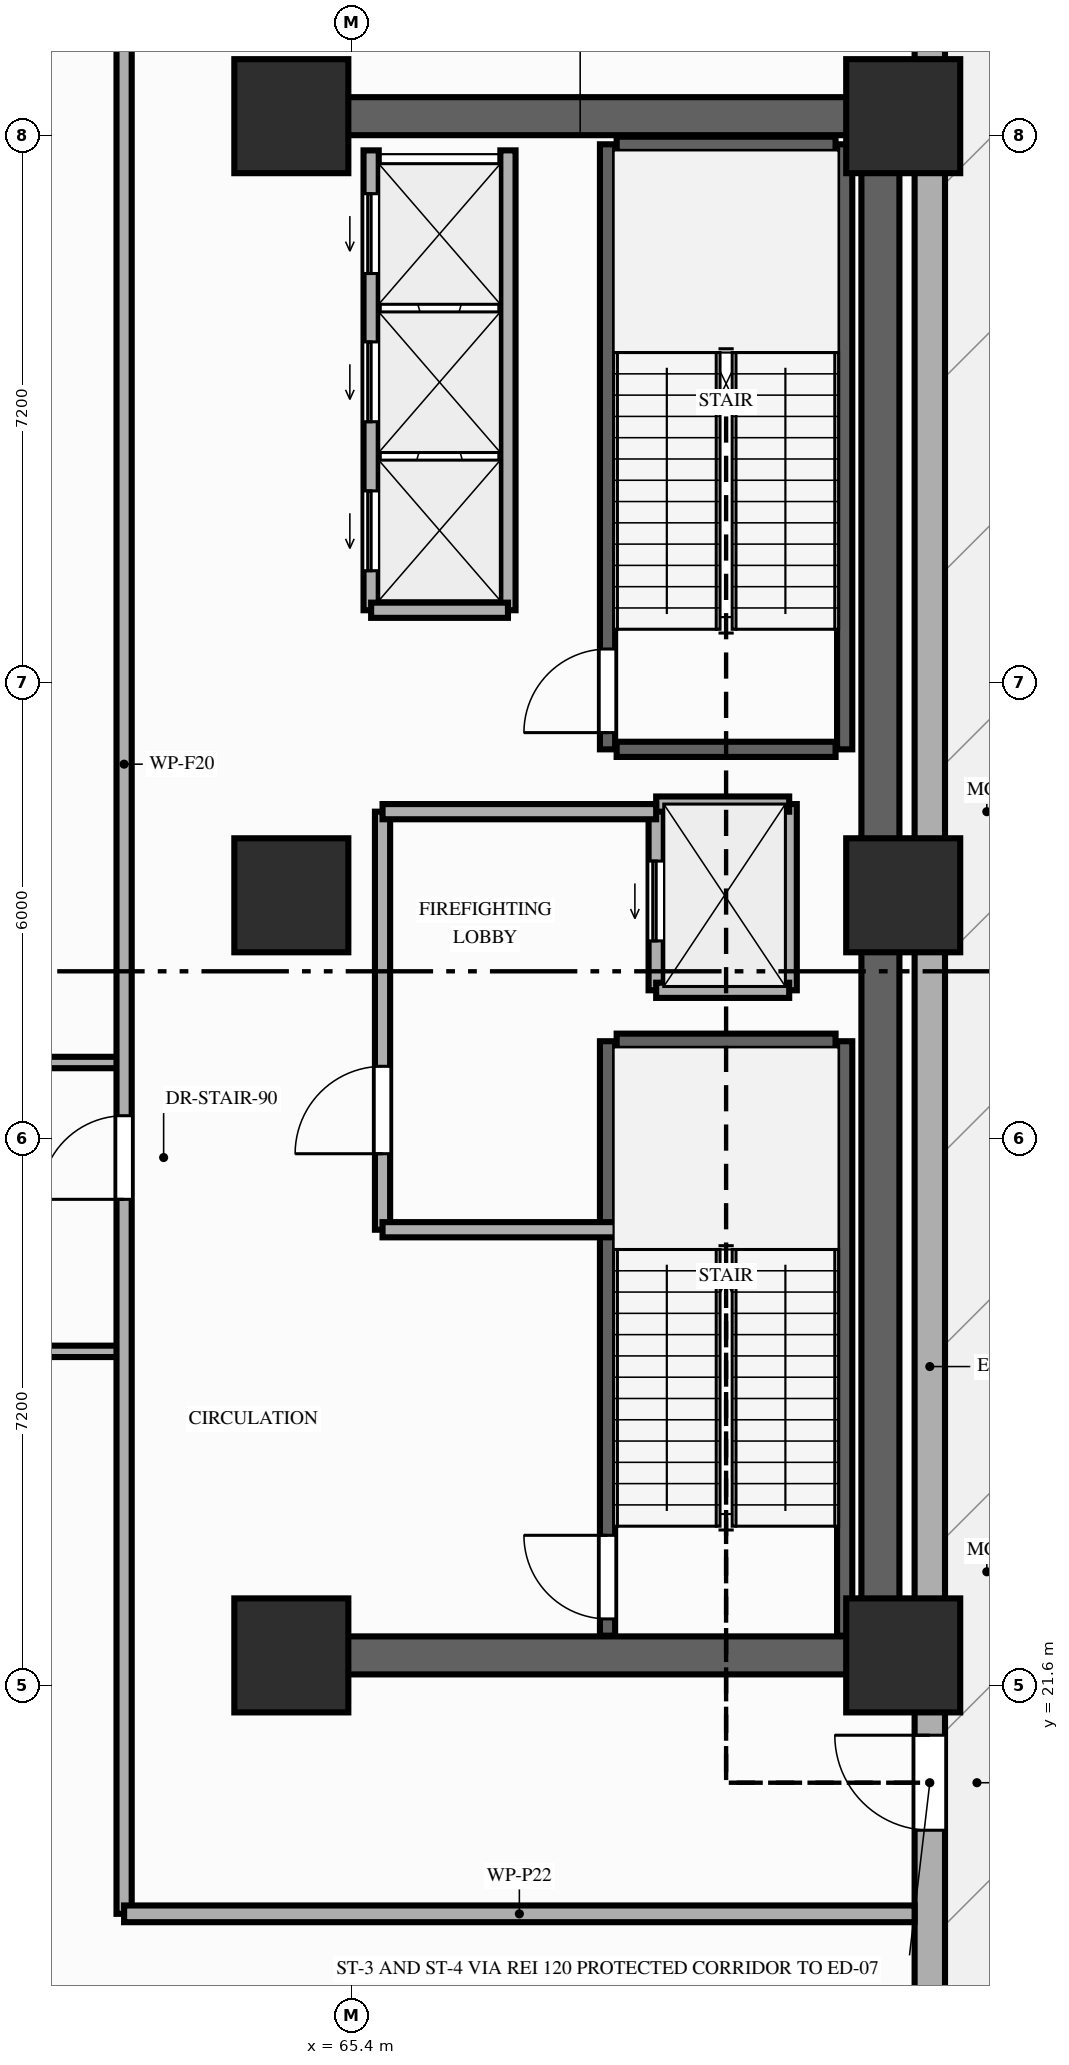
"""IFC4 building model, lengths in metres.
Left out: names, types, materials, properties, quantities, classifications, styles, units other than length and angle.
Written with IfcOpenShell. Run it as: python <this file> out.ifc"""

import sys

from ifc_helpers import new_model, si_unit, direction, frame, frame_2d, origin, origin_2d, place, context, subcontext, project, spatial, rectangle, extrude, element, fill, save


model = new_model("IFC4")
c1 = context("Model", 3, precision=1e-05, world=origin(), true_north=direction((0.0, 1.0)))
c2 = subcontext(c1, "Body", "Model", "MODEL_VIEW")
j1 = project(units=[si_unit("LENGTHUNIT", "METRE"), si_unit("PLANEANGLEUNIT", "RADIAN")], contexts=[c1])
p1 = place(None, origin())
s1 = spatial("IfcSite", under=j1, at=p1, CompositionType="ELEMENT")
p2 = place(p1, origin())
s2 = spatial("IfcBuilding", under=s1, at=p2, CompositionType="ELEMENT")
p3 = place(p2, origin())
s3 = spatial("IfcBuildingStorey", under=s2, at=p3, CompositionType="ELEMENT", Elevation=0.0)
for number, where, z_axis, x_axis in (
    (1, (64.6, 22.0, 0.0), (0.0, 0.0, 1.0), (1.0, 0.0, 0.0)),
    (2, (72.65, 22.0, 0.0), (0.0, 0.0, 1.0), (1.0, 0.0, 0.0)),
    (3, (64.6, 32.0, 0.0), (0.0, 0.0, 1.0), (1.0, 0.0, 0.0)),
    (4, (72.65, 32.0, 0.0), (0.0, 0.0, 1.0), (1.0, 0.0, 0.0)),
    (5, (64.6, 42.25, 0.0), (0.0, 0.0, 1.0), (1.0, 0.0, 0.0)),
    (6, (72.65, 42.25, 0.0), (0.0, 0.0, 1.0), (1.0, 0.0, 0.0)),
):
    element("IfcColumn", number, at=place(p3, frame(where, z_axis=z_axis, x_axis=x_axis)), inside=s3, PredefinedType="COLUMN", context=c2, shape_type="SweptSolid", body=[
        extrude(rectangle(XDim=1.5, YDim=1.5, at=origin_2d()), origin(), (0.0, 0.0, 1.0), 4.6),
    ])
p4 = place(p3, frame((73.0, 2.8, 0.0), z_axis=(0.0, 0.0, 1.0), x_axis=(0.0, 1.0, 0.0)))
e7 = element("IfcWall", 7, at=p4, inside=s3, PredefinedType="STANDARD", context=c2, shape_type="SweptSolid", body=[
    extrude(rectangle(XDim=46.0, YDim=0.4, at=frame_2d((23.0, 0.0))), origin(), (0.0, 0.0, 1.0), 3.63),
])
p5 = place(p4, frame((11.6, 0.0, 0.0)))
e8 = element("IfcOpeningElement", 8, at=p5, cuts=e7, PredefinedType="OPENING", context=c2, shape_type="SweptSolid", body=[
    extrude(rectangle(XDim=1.25, YDim=2.2, at=frame_2d((0.625, 1.1))), frame((0.0, 0.21, 0.0), z_axis=(0.0, -1.0, 0.0), x_axis=(1.0, 0.0, 0.0)), (0.0, 0.0, 1.0), 0.42),
])
p6 = place(p4, frame((4.6, 0.0, 0.0)))
e9 = element("IfcOpeningElement", 9, at=p6, cuts=e7, PredefinedType="OPENING", context=c2, shape_type="SweptSolid", body=[
    extrude(rectangle(XDim=1.8, YDim=2.25, at=frame_2d((0.9, 1.125))), frame((0.0, 0.21, 0.0), z_axis=(0.0, -1.0, 0.0), x_axis=(1.0, 0.0, 0.0)), (0.0, 0.0, 1.0), 0.42),
])
p7 = place(p4, frame((16.9, 0.0, 0.0)))
e10 = element("IfcOpeningElement", 10, at=p7, cuts=e7, PredefinedType="OPENING", context=c2, shape_type="SweptSolid", body=[
    extrude(rectangle(XDim=1.25, YDim=2.2, at=frame_2d((0.625, 1.1))), frame((0.0, 0.21, 0.0), z_axis=(0.0, -1.0, 0.0), x_axis=(1.0, 0.0, 0.0)), (0.0, 0.0, 1.0), 0.42),
])
p8 = place(p4, frame((40.95, 0.0, 0.0)))
e11 = element("IfcOpeningElement", 11, at=p8, cuts=e7, PredefinedType="OPENING", context=c2, shape_type="SweptSolid", body=[
    extrude(rectangle(XDim=2.55, YDim=2.55, at=frame_2d((1.275, 1.275))), frame((0.0, 0.21, 0.0), z_axis=(0.0, -1.0, 0.0), x_axis=(1.0, 0.0, 0.0)), (0.0, 0.0, 1.0), 0.42),
])
p9 = place(p3, frame((72.35, 22.0, 0.0), z_axis=(0.0, 0.0, 1.0), x_axis=(0.0, 1.0, 0.0)))
e12 = element("IfcWall", 12, at=p9, inside=s3, PredefinedType="SHEAR", context=c2, shape_type="SweptSolid", body=[
    extrude(rectangle(XDim=20.25, YDim=0.5, at=frame_2d((10.125, 0.0))), origin(), (0.0, 0.0, 1.0), 4.35),
])
for number, where, z_axis, x_axis in (
    (13, (64.6, 42.25, 0.0), (0.0, 0.0, 1.0), (1.0, 0.0, 0.0)),
    (14, (64.6, 22.0, 0.0), (0.0, 0.0, 1.0), (1.0, 0.0, 0.0)),
):
    element("IfcWall", number, at=place(p3, frame(where, z_axis=z_axis, x_axis=x_axis)), inside=s3, PredefinedType="SHEAR", context=c2, shape_type="SweptSolid", body=[
        extrude(rectangle(XDim=7.5, YDim=0.5, at=frame_2d((3.75, 0.0))), origin(), (0.0, 0.0, 1.0), 4.35),
    ])
p10 = place(p3, frame((68.76, 22.26, 0.0), z_axis=(0.0, 0.0, 1.0), x_axis=(0.0, 1.0, 0.0)))
e15 = element("IfcWall", 15, at=p10, inside=s3, PredefinedType="SHEAR", context=c2, shape_type="SweptSolid", body=[
    extrude(rectangle(XDim=7.82, YDim=0.2, at=frame_2d((3.91, 0.0))), origin(), (0.0, 0.0, 1.0), 4.35),
])
p11 = place(p10, frame((0.22, 0.0, 0.0)))
e16 = element("IfcOpeningElement", 16, at=p11, cuts=e15, PredefinedType="OPENING", context=c2, shape_type="SweptSolid", body=[
    extrude(rectangle(XDim=1.1, YDim=2.15, at=frame_2d((0.55, 1.075))), frame((0.0, 0.11, 0.0), z_axis=(0.0, -1.0, 0.0), x_axis=(1.0, 0.0, 0.0)), (0.0, 0.0, 1.0), 0.22),
])
p12 = place(p3, frame((71.88, 22.26, 0.0), z_axis=(0.0, 0.0, 1.0), x_axis=(0.0, 1.0, 0.0)))
e17 = element("IfcWall", 17, at=p12, inside=s3, PredefinedType="SHEAR", context=c2, shape_type="SweptSolid", body=[
    extrude(rectangle(XDim=7.82, YDim=0.2, at=frame_2d((3.91, 0.0))), origin(), (0.0, 0.0, 1.0), 4.35),
])
p13 = place(p3, frame((68.88, 30.08, 0.0), z_axis=(0.0, 0.0, 1.0), x_axis=(1.0, 0.0, 0.0)))
e18 = element("IfcWall", 18, at=p13, inside=s3, PredefinedType="SHEAR", context=c2, shape_type="SweptSolid", body=[
    extrude(rectangle(XDim=2.88, YDim=0.2, at=frame_2d((1.44, 0.0))), origin(), (0.0, 0.0, 1.0), 4.35),
])
p14 = place(p3, frame((68.76, 33.92, 0.0), z_axis=(0.0, 0.0, 1.0), x_axis=(0.0, 1.0, 0.0)))
e19 = element("IfcWall", 19, at=p14, inside=s3, PredefinedType="SHEAR", context=c2, shape_type="SweptSolid", body=[
    extrude(rectangle(XDim=7.96, YDim=0.2, at=frame_2d((3.98, 0.0))), origin(), (0.0, 0.0, 1.0), 4.35),
])
p15 = place(p14, frame((0.22, 0.0, 0.0)))
e20 = element("IfcOpeningElement", 20, at=p15, cuts=e19, PredefinedType="OPENING", context=c2, shape_type="SweptSolid", body=[
    extrude(rectangle(XDim=1.1, YDim=2.15, at=frame_2d((0.55, 1.075))), frame((0.0, 0.11, 0.0), z_axis=(0.0, -1.0, 0.0), x_axis=(1.0, 0.0, 0.0)), (0.0, 0.0, 1.0), 0.22),
])
p16 = place(p3, frame((71.88, 33.92, 0.0), z_axis=(0.0, 0.0, 1.0), x_axis=(0.0, 1.0, 0.0)))
e21 = element("IfcWall", 21, at=p16, inside=s3, PredefinedType="SHEAR", context=c2, shape_type="SweptSolid", body=[
    extrude(rectangle(XDim=7.96, YDim=0.2, at=frame_2d((3.98, 0.0))), origin(), (0.0, 0.0, 1.0), 4.35),
])
for number, where, z_axis, x_axis in (
    (22, (68.88, 41.88, 0.0), (0.0, 0.0, 1.0), (1.0, 0.0, 0.0)),
    (23, (68.88, 33.92, 0.0), (0.0, 0.0, 1.0), (1.0, 0.0, 0.0)),
):
    element("IfcWall", number, at=place(p3, frame(where, z_axis=z_axis, x_axis=x_axis)), inside=s3, PredefinedType="SHEAR", context=c2, shape_type="SweptSolid", body=[
        extrude(rectangle(XDim=2.88, YDim=0.2, at=frame_2d((1.44, 0.0))), origin(), (0.0, 0.0, 1.0), 4.35),
    ])
p17 = place(p3, frame((65.65, 35.75, 0.0), z_axis=(0.0, 0.0, 1.0), x_axis=(0.0, 1.0, 0.0)))
e24 = element("IfcWall", 24, at=p17, inside=s3, PredefinedType="MOVABLE", context=c2, shape_type="SweptSolid", body=[
    extrude(rectangle(XDim=6.05, YDim=0.2, at=frame_2d((3.025, 0.0))), origin(), (0.0, 0.0, 1.0), 4.35),
])
p18 = place(p17, frame((0.52, 0.0, 0.0)))
e25 = element("IfcOpeningElement", 25, at=p18, cuts=e24, PredefinedType="OPENING", context=c2, shape_type="SweptSolid", body=[
    extrude(rectangle(XDim=1.05, YDim=2.15, at=frame_2d((0.525, 1.075))), frame((0.0, 0.11, 0.0), z_axis=(0.0, -1.0, 0.0), x_axis=(1.0, 0.0, 0.0)), (0.0, 0.0, 1.0), 0.22),
])
p19 = place(p17, frame((2.48, 0.0, 0.0)))
e26 = element("IfcOpeningElement", 26, at=p19, cuts=e24, PredefinedType="OPENING", context=c2, shape_type="SweptSolid", body=[
    extrude(rectangle(XDim=1.05, YDim=2.15, at=frame_2d((0.525, 1.075))), frame((0.0, 0.11, 0.0), z_axis=(0.0, -1.0, 0.0), x_axis=(1.0, 0.0, 0.0)), (0.0, 0.0, 1.0), 0.22),
])
p20 = place(p17, frame((4.43, 0.0, 0.0)))
e27 = element("IfcOpeningElement", 27, at=p20, cuts=e24, PredefinedType="OPENING", context=c2, shape_type="SweptSolid", body=[
    extrude(rectangle(XDim=1.05, YDim=2.15, at=frame_2d((0.525, 1.075))), frame((0.0, 0.11, 0.0), z_axis=(0.0, -1.0, 0.0), x_axis=(1.0, 0.0, 0.0)), (0.0, 0.0, 1.0), 0.22),
])
p21 = place(p3, frame((67.45, 35.75, 0.0), z_axis=(0.0, 0.0, 1.0), x_axis=(0.0, 1.0, 0.0)))
e28 = element("IfcWall", 28, at=p21, inside=s3, PredefinedType="MOVABLE", context=c2, shape_type="SweptSolid", body=[
    extrude(rectangle(XDim=6.05, YDim=0.2, at=frame_2d((3.025, 0.0))), origin(), (0.0, 0.0, 1.0), 4.35),
])
p22 = place(p3, frame((65.65, 35.75, 0.0), z_axis=(0.0, 0.0, 1.0), x_axis=(1.0, 0.0, 0.0)))
e29 = element("IfcWall", 29, at=p22, inside=s3, PredefinedType="MOVABLE", context=c2, shape_type="SweptSolid", body=[
    extrude(rectangle(XDim=1.8, YDim=0.2, at=frame_2d((0.9, 0.0))), origin(), (0.0, 0.0, 1.0), 4.35),
])
p23 = place(p3, frame((69.4, 30.75, 0.0), z_axis=(0.0, 0.0, 1.0), x_axis=(0.0, 1.0, 0.0)))
e30 = element("IfcWall", 30, at=p23, inside=s3, PredefinedType="MOVABLE", context=c2, shape_type="SweptSolid", body=[
    extrude(rectangle(XDim=2.45, YDim=0.2, at=frame_2d((1.225, 0.0))), origin(), (0.0, 0.0, 1.0), 4.35),
])
p24 = place(p23, frame((0.65, 0.0, 0.0)))
e31 = element("IfcOpeningElement", 31, at=p24, cuts=e30, PredefinedType="OPENING", context=c2, shape_type="SweptSolid", body=[
    extrude(rectangle(XDim=1.05, YDim=2.15, at=frame_2d((0.525, 1.075))), frame((0.0, 0.11, 0.0), z_axis=(0.0, -1.0, 0.0), x_axis=(1.0, 0.0, 0.0)), (0.0, 0.0, 1.0), 0.22),
])
p25 = place(p3, frame((71.15, 30.75, 0.0), z_axis=(0.0, 0.0, 1.0), x_axis=(0.0, 1.0, 0.0)))
e32 = element("IfcWall", 32, at=p25, inside=s3, PredefinedType="MOVABLE", context=c2, shape_type="SweptSolid", body=[
    extrude(rectangle(XDim=2.45, YDim=0.2, at=frame_2d((1.225, 0.0))), origin(), (0.0, 0.0, 1.0), 4.35),
])
for number, where, z_axis, x_axis in (
    (33, (69.4, 33.2, 0.0), (0.0, 0.0, 1.0), (1.0, 0.0, 0.0)),
    (34, (69.4, 30.75, 0.0), (0.0, 0.0, 1.0), (1.0, 0.0, 0.0)),
):
    element("IfcWall", number, at=place(p3, frame(where, z_axis=z_axis, x_axis=x_axis)), inside=s3, PredefinedType="MOVABLE", context=c2, shape_type="SweptSolid", body=[
        extrude(rectangle(XDim=1.75, YDim=0.2, at=frame_2d((0.875, 0.0))), origin(), (0.0, 0.0, 1.0), 4.35),
    ])
p26 = place(p3, frame((65.8, 27.6, 0.0), z_axis=(0.0, 0.0, 1.0), x_axis=(0.0, 1.0, 0.0)))
e35 = element("IfcWall", 35, at=p26, inside=s3, PredefinedType="PARTITIONING", context=c2, shape_type="SweptSolid", body=[
    extrude(rectangle(XDim=5.5, YDim=0.2, at=frame_2d((2.75, 0.0))), origin(), (0.0, 0.0, 1.0), 4.35),
])
p27 = place(p26, frame((1.0, 0.0, 0.0)))
e36 = element("IfcOpeningElement", 36, at=p27, cuts=e35, PredefinedType="OPENING", context=c2, shape_type="SweptSolid", body=[
    extrude(rectangle(XDim=1.15, YDim=2.15, at=frame_2d((0.575, 1.075))), frame((0.0, 0.11, 0.0), z_axis=(0.0, -1.0, 0.0), x_axis=(1.0, 0.0, 0.0)), (0.0, 0.0, 1.0), 0.22),
])
p28 = place(p3, frame((65.8, 33.1, 0.0), z_axis=(0.0, 0.0, 1.0), x_axis=(1.0, 0.0, 0.0)))
e37 = element("IfcWall", 37, at=p28, inside=s3, PredefinedType="PARTITIONING", context=c2, shape_type="SweptSolid", body=[
    extrude(rectangle(XDim=3.6, YDim=0.2, at=frame_2d((1.8, 0.0))), origin(), (0.0, 0.0, 1.0), 4.35),
])
p29 = place(p3, frame((65.8, 27.6, 0.0), z_axis=(0.0, 0.0, 1.0), x_axis=(1.0, 0.0, 0.0)))
e38 = element("IfcWall", 38, at=p29, inside=s3, PredefinedType="PARTITIONING", context=c2, shape_type="SweptSolid", body=[
    extrude(rectangle(XDim=3.4, YDim=0.2, at=frame_2d((1.7, 0.0))), origin(), (0.0, 0.0, 1.0), 4.35),
])
p30 = place(p3, frame((50.8, 26.0, 0.0), z_axis=(0.0, 0.0, 1.0), x_axis=(1.0, 0.0, 0.0)))
e39 = element("IfcWall", 39, at=p30, inside=s3, PredefinedType="PARTITIONING", context=c2, shape_type="SweptSolid", body=[
    extrude(rectangle(XDim=11.6, YDim=0.15, at=frame_2d((5.8, 0.0))), origin(), (0.0, 0.0, 1.0), 3.63),
])
p31 = place(p30, frame((3.7, 0.0, 0.0)))
e40 = element("IfcOpeningElement", 40, at=p31, cuts=e39, PredefinedType="OPENING", context=c2, shape_type="SweptSolid", body=[
    extrude(rectangle(XDim=1.5, YDim=2.18, at=frame_2d((0.75, 1.09))), frame((0.0, 0.085, 0.0), z_axis=(0.0, -1.0, 0.0), x_axis=(1.0, 0.0, 0.0)), (0.0, 0.0, 1.0), 0.17),
])
p32 = place(p3, frame((27.15, 29.8, 0.0), z_axis=(0.0, 0.0, 1.0), x_axis=(1.0, 0.0, 0.0)))
e41 = element("IfcWall", 41, at=p32, inside=s3, PredefinedType="PARTITIONING", context=c2, shape_type="SweptSolid", body=[
    extrude(rectangle(XDim=35.25, YDim=0.15, at=frame_2d((17.625, 0.0))), origin(), (0.0, 0.0, 1.0), 3.63),
])
p33 = place(p32, frame((1.4, 0.0, 0.0)))
e42 = element("IfcOpeningElement", 42, at=p33, cuts=e41, PredefinedType="OPENING", context=c2, shape_type="SweptSolid", body=[
    extrude(rectangle(XDim=0.85, YDim=2.1, at=frame_2d((0.425, 1.05))), frame((0.0, 0.085, 0.0), z_axis=(0.0, -1.0, 0.0), x_axis=(1.0, 0.0, 0.0)), (0.0, 0.0, 1.0), 0.17),
])
p34 = place(p32, frame((5.4, 0.0, 0.0)))
e43 = element("IfcOpeningElement", 43, at=p34, cuts=e41, PredefinedType="OPENING", context=c2, shape_type="SweptSolid", body=[
    extrude(rectangle(XDim=0.95, YDim=2.1, at=frame_2d((0.475, 1.05))), frame((0.0, 0.085, 0.0), z_axis=(0.0, -1.0, 0.0), x_axis=(1.0, 0.0, 0.0)), (0.0, 0.0, 1.0), 0.17),
])
p35 = place(p32, frame((12.6, 0.0, 0.0)))
e44 = element("IfcOpeningElement", 44, at=p35, cuts=e41, PredefinedType="OPENING", context=c2, shape_type="SweptSolid", body=[
    extrude(rectangle(XDim=1.0, YDim=2.15, at=frame_2d((0.5, 1.075))), frame((0.0, 0.085, 0.0), z_axis=(0.0, -1.0, 0.0), x_axis=(1.0, 0.0, 0.0)), (0.0, 0.0, 1.0), 0.17),
])
p36 = place(p3, frame((62.4, 18.6, 0.0), z_axis=(0.0, 0.0, 1.0), x_axis=(0.0, 1.0, 0.0)))
e45 = element("IfcWall", 45, at=p36, inside=s3, PredefinedType="PARTITIONING", context=c2, shape_type="SweptSolid", body=[
    extrude(rectangle(XDim=30.25, YDim=0.2, at=frame_2d((15.125, 0.0))), origin(), (0.0, 0.0, 1.0), 3.63),
])
p37 = place(p36, frame((9.4, 0.0, 0.0)))
e46 = element("IfcOpeningElement", 46, at=p37, cuts=e45, PredefinedType="OPENING", context=c2, shape_type="SweptSolid", body=[
    extrude(rectangle(XDim=1.1, YDim=2.15, at=frame_2d((0.55, 1.075))), frame((0.0, 0.11, 0.0), z_axis=(0.0, -1.0, 0.0), x_axis=(1.0, 0.0, 0.0)), (0.0, 0.0, 1.0), 0.22),
])
p38 = place(p3, frame((62.4, 18.6, 0.0), z_axis=(0.0, 0.0, 1.0), x_axis=(1.0, 0.0, 0.0)))
e47 = element("IfcWall", 47, at=p38, inside=s3, PredefinedType="PARTITIONING", context=c2, shape_type="SweptSolid", body=[
    extrude(rectangle(XDim=10.4, YDim=0.22, at=frame_2d((5.2, 0.0))), origin(), (0.0, 0.0, 1.0), 3.63),
])
p39 = place(p7, frame((1.25, 0.0, 0.0), z_axis=(0.0, 0.0, 1.0), x_axis=(-1.0, 0.0, 0.0)))
e48 = element("IfcDoor", 48, at=p39, inside=s3, OperationType="SINGLE_SWING_RIGHT", PredefinedType="DOOR", context=c2, shape_type="SweptSolid", body=[
    extrude(rectangle(XDim=1.25, YDim=2.2, at=frame_2d((0.625, 1.1))), frame((0.0, 0.025, 0.0), z_axis=(0.0, -1.0, 0.0), x_axis=(1.0, 0.0, 0.0)), (0.0, 0.0, 1.0), 0.05),
])
fill(e10, e48)
p40 = place(p11, origin())
e49 = element("IfcDoor", 49, at=p40, inside=s3, OperationType="SINGLE_SWING_RIGHT", PredefinedType="DOOR", context=c2, shape_type="SweptSolid", body=[
    extrude(rectangle(XDim=1.1, YDim=2.15, at=frame_2d((0.55, 1.075))), frame((0.0, 0.025, 0.0), z_axis=(0.0, -1.0, 0.0), x_axis=(1.0, 0.0, 0.0)), (0.0, 0.0, 1.0), 0.05),
])
fill(e16, e49)
p41 = place(p15, origin())
e50 = element("IfcDoor", 50, at=p41, inside=s3, OperationType="SINGLE_SWING_LEFT", PredefinedType="DOOR", context=c2, shape_type="SweptSolid", body=[
    extrude(rectangle(XDim=1.1, YDim=2.15, at=frame_2d((0.55, 1.075))), frame((0.0, 0.025, 0.0), z_axis=(0.0, -1.0, 0.0), x_axis=(1.0, 0.0, 0.0)), (0.0, 0.0, 1.0), 0.05),
])
fill(e20, e50)
p42 = place(p18, origin())
e51 = element("IfcDoor", 51, at=p42, inside=s3, OperationType="SLIDING_TO_LEFT", PredefinedType="DOOR", context=c2, shape_type="SweptSolid", body=[
    extrude(rectangle(XDim=1.05, YDim=2.15, at=frame_2d((0.525, 1.075))), frame((0.0, 0.025, 0.0), z_axis=(0.0, -1.0, 0.0), x_axis=(1.0, 0.0, 0.0)), (0.0, 0.0, 1.0), 0.05),
])
fill(e25, e51)
p43 = place(p19, origin())
e52 = element("IfcDoor", 52, at=p43, inside=s3, OperationType="SLIDING_TO_LEFT", PredefinedType="DOOR", context=c2, shape_type="SweptSolid", body=[
    extrude(rectangle(XDim=1.05, YDim=2.15, at=frame_2d((0.525, 1.075))), frame((0.0, 0.025, 0.0), z_axis=(0.0, -1.0, 0.0), x_axis=(1.0, 0.0, 0.0)), (0.0, 0.0, 1.0), 0.05),
])
fill(e26, e52)
p44 = place(p20, origin())
e53 = element("IfcDoor", 53, at=p44, inside=s3, OperationType="SLIDING_TO_LEFT", PredefinedType="DOOR", context=c2, shape_type="SweptSolid", body=[
    extrude(rectangle(XDim=1.05, YDim=2.15, at=frame_2d((0.525, 1.075))), frame((0.0, 0.025, 0.0), z_axis=(0.0, -1.0, 0.0), x_axis=(1.0, 0.0, 0.0)), (0.0, 0.0, 1.0), 0.05),
])
fill(e27, e53)
p45 = place(p24, origin())
e54 = element("IfcDoor", 54, at=p45, inside=s3, OperationType="SLIDING_TO_LEFT", PredefinedType="DOOR", context=c2, shape_type="SweptSolid", body=[
    extrude(rectangle(XDim=1.05, YDim=2.15, at=frame_2d((0.525, 1.075))), frame((0.0, 0.025, 0.0), z_axis=(0.0, -1.0, 0.0), x_axis=(1.0, 0.0, 0.0)), (0.0, 0.0, 1.0), 0.05),
])
fill(e31, e54)
p46 = place(p27, origin())
e55 = element("IfcDoor", 55, at=p46, inside=s3, OperationType="SINGLE_SWING_LEFT", PredefinedType="DOOR", context=c2, shape_type="SweptSolid", body=[
    extrude(rectangle(XDim=1.15, YDim=2.15, at=frame_2d((0.575, 1.075))), frame((0.0, 0.025, 0.0), z_axis=(0.0, -1.0, 0.0), x_axis=(1.0, 0.0, 0.0)), (0.0, 0.0, 1.0), 0.05),
])
fill(e36, e55)
p47 = place(p37, origin())
e56 = element("IfcDoor", 56, at=p47, inside=s3, OperationType="SINGLE_SWING_LEFT", PredefinedType="DOOR", context=c2, shape_type="SweptSolid", body=[
    extrude(rectangle(XDim=1.1, YDim=2.15, at=frame_2d((0.55, 1.075))), frame((0.0, 0.025, 0.0), z_axis=(0.0, -1.0, 0.0), x_axis=(1.0, 0.0, 0.0)), (0.0, 0.0, 1.0), 0.05),
])
fill(e46, e56)
save(model, sys.argv[1])
